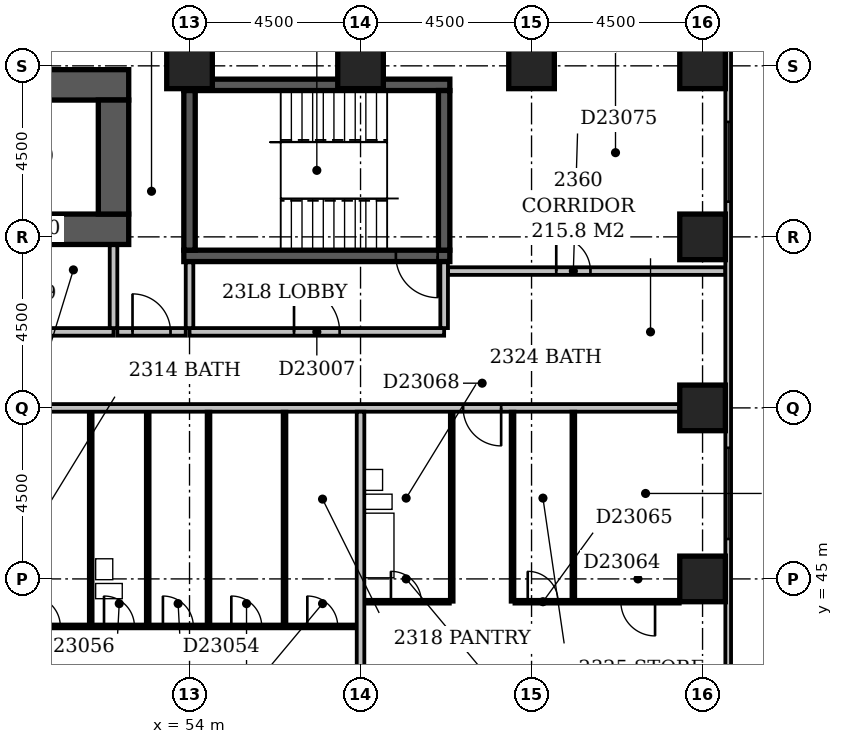
"""IFC4 building model, lengths in metres.
Left out: names, types, materials, properties, quantities, classifications, styles, units other than length and angle.
Written with IfcOpenShell. Run it as: python <this file> out.ifc"""

import sys

from ifc_helpers import new_model, si_unit, direction, frame, frame_2d, origin, origin_2d, place, context, subcontext, project, spatial, rectangle, extrude, element, fill, save


model = new_model("IFC4")
c1 = context("Model", 3, precision=1e-05, world=origin(), true_north=direction((0.0, 1.0)))
c2 = subcontext(c1, "Body", "Model", "MODEL_VIEW")
j1 = project(units=[si_unit("LENGTHUNIT", "METRE"), si_unit("PLANEANGLEUNIT", "RADIAN")], contexts=[c1])
p1 = place(None, origin())
s1 = spatial("IfcSite", under=j1, at=p1, CompositionType="ELEMENT")
p2 = place(p1, origin())
s2 = spatial("IfcBuilding", under=s1, at=p2, CompositionType="ELEMENT")
p3 = place(p2, frame((0.0, 0.0, 93.8)))
s3 = spatial("IfcBuildingStorey", under=s2, at=p3, CompositionType="ELEMENT", Elevation=93.8)
for number, where, z_axis, x_axis in (
    (1, (47.0, 54.2, -0.3), (0.0, 0.0, 1.0), (1.0, 0.0, 0.0)),
    (2, (47.0, 58.0, -0.3), (0.0, 0.0, 1.0), (1.0, 0.0, 0.0)),
):
    element("IfcWall", number, at=place(p3, frame(where, z_axis=z_axis, x_axis=x_axis)), inside=s3, PredefinedType="SHEAR", context=c2, shape_type="SweptSolid", body=[
        extrude(rectangle(XDim=5.4, YDim=0.8, at=frame_2d((2.7, 0.0))), origin(), (0.0, 0.0, 1.0), 3.6),
    ])
p4 = place(p3, frame((52.0, 54.6, -0.3), z_axis=(0.0, 0.0, 1.0), x_axis=(0.0, 1.0, 0.0)))
e3 = element("IfcWall", 3, at=p4, inside=s3, PredefinedType="SHEAR", context=c2, shape_type="SweptSolid", body=[
    extrude(rectangle(XDim=3.0, YDim=0.8, at=frame_2d((1.5, 0.0))), origin(), (0.0, 0.0, 1.0), 3.6),
])
p5 = place(p3, frame((53.85, 53.5, -0.3), z_axis=(0.0, 0.0, 1.0), x_axis=(1.0, 0.0, 0.0)))
e4 = element("IfcWall", 4, at=p5, inside=s3, PredefinedType="SHEAR", context=c2, shape_type="SweptSolid", body=[
    extrude(rectangle(XDim=7.0, YDim=0.3, at=frame_2d((3.5, 0.0))), origin(), (0.0, 0.0, 1.0), 3.6),
])
p6 = place(p5, frame((5.58, 0.0, 0.3)))
e5 = element("IfcOpeningElement", 5, at=p6, cuts=e4, PredefinedType="OPENING", context=c2, shape_type="SweptSolid", body=[
    extrude(rectangle(XDim=1.1, YDim=2.1, at=frame_2d((0.55, 1.05))), frame((0.0, 0.162, 0.0), z_axis=(0.0, -1.0, 0.0), x_axis=(1.0, 0.0, 0.0)), (0.0, 0.0, 1.0), 0.324),
])
p7 = place(p3, frame((53.85, 58.0, -0.3), z_axis=(0.0, 0.0, 1.0), x_axis=(1.0, 0.0, 0.0)))
e6 = element("IfcWall", 6, at=p7, inside=s3, PredefinedType="SHEAR", context=c2, shape_type="SweptSolid", body=[
    extrude(rectangle(XDim=7.0, YDim=0.3, at=frame_2d((3.5, 0.0))), origin(), (0.0, 0.0, 1.0), 3.6),
])
for number, where, z_axis, x_axis in (
    (7, (54.0, 53.65, -0.3), (0.0, 0.0, 1.0), (0.0, 1.0, 0.0)),
    (8, (60.7, 53.65, -0.3), (0.0, 0.0, 1.0), (0.0, 1.0, 0.0)),
):
    element("IfcWall", number, at=place(p3, frame(where, z_axis=z_axis, x_axis=x_axis)), inside=s3, PredefinedType="SHEAR", context=c2, shape_type="SweptSolid", body=[
        extrude(rectangle(XDim=4.2, YDim=0.3, at=frame_2d((2.1, 0.0))), origin(), (0.0, 0.0, 1.0), 3.6),
    ])
for number, where, z_axis, x_axis in (
    (9, (67.5, 45.0, -0.3), (0.0, 0.0, 1.0), (1.0, 0.0, 0.0)),
    (10, (67.5, 49.5, -0.3), (0.0, 0.0, 1.0), (1.0, 0.0, 0.0)),
    (11, (67.5, 54.0, -0.3), (0.0, 0.0, 1.0), (1.0, 0.0, 0.0)),
    (12, (54.0, 58.5, -0.3), (0.0, 0.0, 1.0), (1.0, 0.0, 0.0)),
    (13, (58.5, 58.5, -0.3), (0.0, 0.0, 1.0), (1.0, 0.0, 0.0)),
    (14, (63.0, 58.5, -0.3), (0.0, 0.0, 1.0), (1.0, 0.0, 0.0)),
    (15, (67.5, 58.5, -0.3), (0.0, 0.0, 1.0), (1.0, 0.0, 0.0)),
):
    element("IfcColumn", number, at=place(p3, frame(where, z_axis=z_axis, x_axis=x_axis)), inside=s3, PredefinedType="COLUMN", context=c2, shape_type="SweptSolid", body=[
        extrude(rectangle(XDim=1.2, YDim=1.2, at=origin_2d()), origin(), (0.0, 0.0, 1.0), 3.6),
    ])
p8 = place(p3, frame((68.175, 35.4, 0.0), z_axis=(0.0, 0.0, 1.0), x_axis=(0.0, 1.0, 0.0)))
e16 = element("IfcWall", 16, at=p8, inside=s3, PredefinedType="STANDARD", context=c2, shape_type="SweptSolid", body=[
    extrude(rectangle(XDim=23.85, YDim=0.15, at=frame_2d((11.925, 0.0))), origin(), (0.0, 0.0, 1.0), 2.7),
])
p9 = place(p8, frame((2.49, 0.0, 0.6)))
e17 = element("IfcOpeningElement", 17, at=p9, cuts=e16, PredefinedType="OPENING", context=c2, shape_type="SweptSolid", body=[
    extrude(rectangle(XDim=1.8, YDim=1.8, at=frame_2d((0.9, 0.9))), frame((0.0, 0.087, 0.0), z_axis=(0.0, -1.0, 0.0), x_axis=(1.0, 0.0, 0.0)), (0.0, 0.0, 1.0), 0.174),
])
p10 = place(p8, frame((10.65, 0.0, 0.6)))
e18 = element("IfcOpeningElement", 18, at=p10, cuts=e16, PredefinedType="OPENING", context=c2, shape_type="SweptSolid", body=[
    extrude(rectangle(XDim=2.4, YDim=1.8, at=frame_2d((1.2, 0.9))), frame((0.0, 0.087, 0.0), z_axis=(0.0, -1.0, 0.0), x_axis=(1.0, 0.0, 0.0)), (0.0, 0.0, 1.0), 0.174),
])
p11 = place(p8, frame((19.526, 0.0, 0.6)))
e19 = element("IfcOpeningElement", 19, at=p11, cuts=e16, PredefinedType="OPENING", context=c2, shape_type="SweptSolid", body=[
    extrude(rectangle(XDim=2.1, YDim=1.8, at=frame_2d((1.05, 0.9))), frame((0.0, 0.087, 0.0), z_axis=(0.0, -1.0, 0.0), x_axis=(1.0, 0.0, 0.0)), (0.0, 0.0, 1.0), 0.174),
])
p12 = place(p3, frame((47.0, 51.5, 0.0), z_axis=(0.0, 0.0, 1.0), x_axis=(1.0, 0.0, 0.0)))
e20 = element("IfcWall", 20, at=p12, inside=s3, PredefinedType="PARTITIONING", context=c2, shape_type="SweptSolid", body=[
    extrude(rectangle(XDim=5.0, YDim=0.2, at=frame_2d((2.5, 0.0))), origin(), (0.0, 0.0, 1.0), 3.3),
])
p13 = place(p12, frame((1.9, 0.0, 0.0)))
e21 = element("IfcOpeningElement", 21, at=p13, cuts=e20, PredefinedType="OPENING", context=c2, shape_type="SweptSolid", body=[
    extrude(rectangle(XDim=1.2, YDim=2.1, at=frame_2d((0.6, 1.05))), frame((0.0, 0.112, 0.0), z_axis=(0.0, -1.0, 0.0), x_axis=(1.0, 0.0, 0.0)), (0.0, 0.0, 1.0), 0.224),
])
p14 = place(p3, frame((52.0, 51.6, 0.0), z_axis=(0.0, 0.0, 1.0), x_axis=(0.0, 1.0, 0.0)))
e22 = element("IfcWall", 22, at=p14, inside=s3, PredefinedType="PARTITIONING", context=c2, shape_type="SweptSolid", body=[
    extrude(rectangle(XDim=2.18, YDim=0.2, at=frame_2d((1.09, 0.0))), origin(), (0.0, 0.0, 1.0), 3.3),
])
p15 = place(p3, frame((54.0, 51.5, 0.0), z_axis=(0.0, 0.0, 1.0), x_axis=(1.0, 0.0, 0.0)))
e23 = element("IfcWall", 23, at=p15, inside=s3, PredefinedType="PARTITIONING", context=c2, shape_type="SweptSolid", body=[
    extrude(rectangle(XDim=6.7, YDim=0.2, at=frame_2d((3.35, 0.0))), origin(), (0.0, 0.0, 1.0), 3.3),
])
p16 = place(p15, frame((2.75, 0.0, 0.0)))
e24 = element("IfcOpeningElement", 24, at=p16, cuts=e23, PredefinedType="OPENING", context=c2, shape_type="SweptSolid", body=[
    extrude(rectangle(XDim=1.2, YDim=2.1, at=frame_2d((0.6, 1.05))), frame((0.0, 0.112, 0.0), z_axis=(0.0, -1.0, 0.0), x_axis=(1.0, 0.0, 0.0)), (0.0, 0.0, 1.0), 0.224),
])
p17 = place(p3, frame((60.7, 51.6, 0.0), z_axis=(0.0, 0.0, 1.0), x_axis=(0.0, 1.0, 0.0)))
e25 = element("IfcWall", 25, at=p17, inside=s3, PredefinedType="PARTITIONING", context=c2, shape_type="SweptSolid", body=[
    extrude(rectangle(XDim=1.73, YDim=0.2, at=frame_2d((0.865, 0.0))), origin(), (0.0, 0.0, 1.0), 3.3),
])
p18 = place(p3, frame((54.0, 51.6, 0.0), z_axis=(0.0, 0.0, 1.0), x_axis=(0.0, 1.0, 0.0)))
e26 = element("IfcWall", 26, at=p18, inside=s3, PredefinedType="PARTITIONING", context=c2, shape_type="SweptSolid", body=[
    extrude(rectangle(XDim=1.73, YDim=0.2, at=frame_2d((0.865, 0.0))), origin(), (0.0, 0.0, 1.0), 2.6),
])
p19 = place(p3, frame((58.5, 36.6, 0.0), z_axis=(0.0, 0.0, 1.0), x_axis=(0.0, 1.0, 0.0)))
e27 = element("IfcWall", 27, at=p19, inside=s3, PredefinedType="PARTITIONING", context=c2, shape_type="SweptSolid", body=[
    extrude(rectangle(XDim=12.8, YDim=0.2, at=frame_2d((6.4, 0.0))), origin(), (0.0, 0.0, 1.0), 3.3),
])
p20 = place(p3, frame((49.05, 43.75, 0.0), z_axis=(0.0, 0.0, 1.0), x_axis=(1.0, 0.0, 0.0)))
e28 = element("IfcWall", 28, at=p20, inside=s3, PredefinedType="PARTITIONING", context=c2, shape_type="SweptSolid", body=[
    extrude(rectangle(XDim=9.35, YDim=0.1, at=frame_2d((4.675, 0.0))), origin(), (0.0, 0.0, 1.0), 3.3),
])
p21 = place(p20, frame((0.75, 0.0, 0.0)))
e29 = element("IfcOpeningElement", 29, at=p21, cuts=e28, PredefinedType="OPENING", context=c2, shape_type="SweptSolid", body=[
    extrude(rectangle(XDim=0.8, YDim=2.1, at=frame_2d((0.4, 1.05))), frame((0.0, 0.062, 0.0), z_axis=(0.0, -1.0, 0.0), x_axis=(1.0, 0.0, 0.0)), (0.0, 0.0, 1.0), 0.124),
])
p22 = place(p20, frame((8.05, 0.0, 0.0)))
e30 = element("IfcOpeningElement", 30, at=p22, cuts=e28, PredefinedType="OPENING", context=c2, shape_type="SweptSolid", body=[
    extrude(rectangle(XDim=0.8, YDim=2.1, at=frame_2d((0.4, 1.05))), frame((0.0, 0.062, 0.0), z_axis=(0.0, -1.0, 0.0), x_axis=(1.0, 0.0, 0.0)), (0.0, 0.0, 1.0), 0.124),
])
p23 = place(p20, frame((4.25, 0.0, 0.0)))
e31 = element("IfcOpeningElement", 31, at=p23, cuts=e28, PredefinedType="OPENING", context=c2, shape_type="SweptSolid", body=[
    extrude(rectangle(XDim=0.8, YDim=2.1, at=frame_2d((0.4, 1.05))), frame((0.0, 0.062, 0.0), z_axis=(0.0, -1.0, 0.0), x_axis=(1.0, 0.0, 0.0)), (0.0, 0.0, 1.0), 0.124),
])
p24 = place(p20, frame((6.05, 0.0, 0.0)))
e32 = element("IfcOpeningElement", 32, at=p24, cuts=e28, PredefinedType="OPENING", context=c2, shape_type="SweptSolid", body=[
    extrude(rectangle(XDim=0.8, YDim=2.1, at=frame_2d((0.4, 1.05))), frame((0.0, 0.062, 0.0), z_axis=(0.0, -1.0, 0.0), x_axis=(1.0, 0.0, 0.0)), (0.0, 0.0, 1.0), 0.124),
])
p25 = place(p20, frame((2.7, 0.0, 0.0)))
e33 = element("IfcOpeningElement", 33, at=p25, cuts=e28, PredefinedType="OPENING", context=c2, shape_type="SweptSolid", body=[
    extrude(rectangle(XDim=0.8, YDim=2.1, at=frame_2d((0.4, 1.05))), frame((0.0, 0.062, 0.0), z_axis=(0.0, -1.0, 0.0), x_axis=(1.0, 0.0, 0.0)), (0.0, 0.0, 1.0), 0.124),
])
for number, where, z_axis, x_axis in (
    (34, (51.4, 43.8, 0.0), (0.0, 0.0, 1.0), (0.0, 1.0, 0.0)),
    (35, (52.9, 43.8, 0.0), (0.0, 0.0, 1.0), (0.0, 1.0, 0.0)),
):
    element("IfcWall", number, at=place(p3, frame(where, z_axis=z_axis, x_axis=x_axis)), inside=s3, PredefinedType="PLUMBINGWALL", context=c2, shape_type="SweptSolid", body=[
        extrude(rectangle(XDim=5.6, YDim=0.1, at=frame_2d((2.8, 0.0))), origin(), (0.0, 0.0, 1.0), 3.3),
    ])
p26 = place(p3, frame((54.5, 43.8, 0.0), z_axis=(0.0, 0.0, 1.0), x_axis=(0.0, 1.0, 0.0)))
e36 = element("IfcWall", 36, at=p26, inside=s3, PredefinedType="PARTITIONING", context=c2, shape_type="SweptSolid", body=[
    extrude(rectangle(XDim=5.6, YDim=0.1, at=frame_2d((2.8, 0.0))), origin(), (0.0, 0.0, 1.0), 2.6),
])
p27 = place(p3, frame((56.5, 43.8, 0.0), z_axis=(0.0, 0.0, 1.0), x_axis=(0.0, 1.0, 0.0)))
e37 = element("IfcWall", 37, at=p27, inside=s3, PredefinedType="PARTITIONING", context=c2, shape_type="SweptSolid", body=[
    extrude(rectangle(XDim=5.6, YDim=0.1, at=frame_2d((2.8, 0.0))), origin(), (0.0, 0.0, 1.0), 3.3),
])
p28 = place(p3, frame((58.6, 44.4, 0.0), z_axis=(0.0, 0.0, 1.0), x_axis=(1.0, 0.0, 0.0)))
e38 = element("IfcWall", 38, at=p28, inside=s3, PredefinedType="PARTITIONING", context=c2, shape_type="SweptSolid", body=[
    extrude(rectangle(XDim=2.25, YDim=0.1, at=frame_2d((1.125, 0.0))), origin(), (0.0, 0.0, 1.0), 3.3),
])
p29 = place(p28, frame((0.7, 0.0, 0.0)))
e39 = element("IfcOpeningElement", 39, at=p29, cuts=e38, PredefinedType="OPENING", context=c2, shape_type="SweptSolid", body=[
    extrude(rectangle(XDim=0.8, YDim=2.1, at=frame_2d((0.4, 1.05))), frame((0.0, 0.062, 0.0), z_axis=(0.0, -1.0, 0.0), x_axis=(1.0, 0.0, 0.0)), (0.0, 0.0, 1.0), 0.124),
])
p30 = place(p3, frame((60.9, 44.4, 0.0), z_axis=(0.0, 0.0, 1.0), x_axis=(0.0, 1.0, 0.0)))
e40 = element("IfcWall", 40, at=p30, inside=s3, PredefinedType="PLUMBINGWALL", context=c2, shape_type="SweptSolid", body=[
    extrude(rectangle(XDim=5.0, YDim=0.1, at=frame_2d((2.5, 0.0))), origin(), (0.0, 0.0, 1.0), 3.3),
])
p31 = place(p3, frame((62.5, 44.4, 0.0), z_axis=(0.0, 0.0, 1.0), x_axis=(0.0, 1.0, 0.0)))
e41 = element("IfcWall", 41, at=p31, inside=s3, PredefinedType="PARTITIONING", context=c2, shape_type="SweptSolid", body=[
    extrude(rectangle(XDim=5.0, YDim=0.1, at=frame_2d((2.5, 0.0))), origin(), (0.0, 0.0, 1.0), 2.4),
])
p32 = place(p3, frame((62.55, 44.4, 0.0), z_axis=(0.0, 0.0, 1.0), x_axis=(1.0, 0.0, 0.0)))
e42 = element("IfcWall", 42, at=p32, inside=s3, PredefinedType="PARTITIONING", context=c2, shape_type="SweptSolid", body=[
    extrude(rectangle(XDim=4.35, YDim=0.1, at=frame_2d((2.175, 0.0))), origin(), (0.0, 0.0, 1.0), 3.3),
])
p33 = place(p32, frame((2.8, 0.0, 0.0)))
e43 = element("IfcOpeningElement", 43, at=p33, cuts=e42, PredefinedType="OPENING", context=c2, shape_type="SweptSolid", body=[
    extrude(rectangle(XDim=0.9, YDim=2.1, at=frame_2d((0.45, 1.05))), frame((0.0, 0.062, 0.0), z_axis=(0.0, -1.0, 0.0), x_axis=(1.0, 0.0, 0.0)), (0.0, 0.0, 1.0), 0.124),
])
p34 = place(p32, frame((0.35, 0.0, 0.0)))
e44 = element("IfcOpeningElement", 44, at=p34, cuts=e42, PredefinedType="OPENING", context=c2, shape_type="SweptSolid", body=[
    extrude(rectangle(XDim=0.8, YDim=2.1, at=frame_2d((0.4, 1.05))), frame((0.0, 0.062, 0.0), z_axis=(0.0, -1.0, 0.0), x_axis=(1.0, 0.0, 0.0)), (0.0, 0.0, 1.0), 0.124),
])
p35 = place(p3, frame((64.1, 44.45, 0.0), z_axis=(0.0, 0.0, 1.0), x_axis=(0.0, 1.0, 0.0)))
e45 = element("IfcWall", 45, at=p35, inside=s3, PredefinedType="PARTITIONING", context=c2, shape_type="SweptSolid", body=[
    extrude(rectangle(XDim=4.95, YDim=0.1, at=frame_2d((2.475, 0.0))), origin(), (0.0, 0.0, 1.0), 3.3),
])
p36 = place(p3, frame((9.1, 49.5, 0.0), z_axis=(0.0, 0.0, 1.0), x_axis=(1.0, 0.0, 0.0)))
e46 = element("IfcWall", 46, at=p36, inside=s3, PredefinedType="PARTITIONING", context=c2, shape_type="SweptSolid", body=[
    extrude(rectangle(XDim=57.8, YDim=0.2, at=frame_2d((28.9, 0.0))), origin(), (0.0, 0.0, 1.0), 3.3),
])
p37 = place(p36, frame((13.7, 0.0, 0.0)))
e47 = element("IfcOpeningElement", 47, at=p37, cuts=e46, PredefinedType="OPENING", context=c2, shape_type="SweptSolid", body=[
    extrude(rectangle(XDim=1.0, YDim=2.1, at=frame_2d((0.5, 1.05))), frame((0.0, 0.112, 0.0), z_axis=(0.0, -1.0, 0.0), x_axis=(1.0, 0.0, 0.0)), (0.0, 0.0, 1.0), 0.224),
])
p38 = place(p36, frame((38.6, 0.0, 0.0)))
e48 = element("IfcOpeningElement", 48, at=p38, cuts=e46, PredefinedType="OPENING", context=c2, shape_type="SweptSolid", body=[
    extrude(rectangle(XDim=1.0, YDim=2.1, at=frame_2d((0.5, 1.05))), frame((0.0, 0.112, 0.0), z_axis=(0.0, -1.0, 0.0), x_axis=(1.0, 0.0, 0.0)), (0.0, 0.0, 1.0), 0.224),
])
p39 = place(p36, frame((52.1, 0.0, 0.0)))
e49 = element("IfcOpeningElement", 49, at=p39, cuts=e46, PredefinedType="OPENING", context=c2, shape_type="SweptSolid", body=[
    extrude(rectangle(XDim=1.0, YDim=2.1, at=frame_2d((0.5, 1.05))), frame((0.0, 0.112, 0.0), z_axis=(0.0, -1.0, 0.0), x_axis=(1.0, 0.0, 0.0)), (0.0, 0.0, 1.0), 0.224),
])
p40 = place(p36, frame((6.15, 0.0, 0.0)))
e50 = element("IfcOpeningElement", 50, at=p40, cuts=e46, PredefinedType="OPENING", context=c2, shape_type="SweptSolid", body=[
    extrude(rectangle(XDim=0.9, YDim=2.1, at=frame_2d((0.45, 1.05))), frame((0.0, 0.112, 0.0), z_axis=(0.0, -1.0, 0.0), x_axis=(1.0, 0.0, 0.0)), (0.0, 0.0, 1.0), 0.224),
])
p41 = place(p36, frame((10.65, 0.0, 0.0)))
e51 = element("IfcOpeningElement", 51, at=p41, cuts=e46, PredefinedType="OPENING", context=c2, shape_type="SweptSolid", body=[
    extrude(rectangle(XDim=0.9, YDim=2.1, at=frame_2d((0.45, 1.05))), frame((0.0, 0.112, 0.0), z_axis=(0.0, -1.0, 0.0), x_axis=(1.0, 0.0, 0.0)), (0.0, 0.0, 1.0), 0.224),
])
p42 = place(p3, frame((52.1, 51.5, 0.0), z_axis=(0.0, 0.0, 1.0), x_axis=(1.0, 0.0, 0.0)))
e52 = element("IfcWall", 52, at=p42, inside=s3, PredefinedType="PARTITIONING", context=c2, shape_type="SweptSolid", body=[
    extrude(rectangle(XDim=1.8, YDim=0.2, at=frame_2d((0.9, 0.0))), origin(), (0.0, 0.0, 1.0), 3.3),
])
p43 = place(p42, frame((0.4, 0.0, 0.0)))
e53 = element("IfcOpeningElement", 53, at=p43, cuts=e52, PredefinedType="OPENING", context=c2, shape_type="SweptSolid", body=[
    extrude(rectangle(XDim=1.0, YDim=2.1, at=frame_2d((0.5, 1.05))), frame((0.0, 0.112, 0.0), z_axis=(0.0, -1.0, 0.0), x_axis=(1.0, 0.0, 0.0)), (0.0, 0.0, 1.0), 0.224),
])
p44 = place(p3, frame((60.8, 53.1, 0.0), z_axis=(0.0, 0.0, 1.0), x_axis=(1.0, 0.0, 0.0)))
e54 = element("IfcWall", 54, at=p44, inside=s3, PredefinedType="PARTITIONING", context=c2, shape_type="SweptSolid", body=[
    extrude(rectangle(XDim=7.3, YDim=0.2, at=frame_2d((3.65, 0.0))), origin(), (0.0, 0.0, 1.0), 3.3),
])
p45 = place(p44, frame((2.85, 0.0, 0.0)))
e55 = element("IfcOpeningElement", 55, at=p45, cuts=e54, PredefinedType="OPENING", context=c2, shape_type="SweptSolid", body=[
    extrude(rectangle(XDim=0.9, YDim=2.1, at=frame_2d((0.45, 1.05))), frame((0.0, 0.112, 0.0), z_axis=(0.0, -1.0, 0.0), x_axis=(1.0, 0.0, 0.0)), (0.0, 0.0, 1.0), 0.224),
])
p46 = place(p10, origin())
e56 = element("IfcWindow", 56, at=p46, inside=s3, PartitioningType="SINGLE_PANEL", PredefinedType="WINDOW", context=c2, shape_type="SweptSolid", body=[
    extrude(rectangle(XDim=2.4, YDim=1.8, at=frame_2d((1.2, 0.9))), frame((0.0, 0.03, 0.0), z_axis=(0.0, -1.0, 0.0), x_axis=(1.0, 0.0, 0.0)), (0.0, 0.0, 1.0), 0.06),
])
fill(e18, e56)
p47 = place(p11, origin())
e57 = element("IfcWindow", 57, at=p47, inside=s3, PartitioningType="SINGLE_PANEL", PredefinedType="WINDOW", context=c2, shape_type="SweptSolid", body=[
    extrude(rectangle(XDim=2.1, YDim=1.8, at=frame_2d((1.05, 0.9))), frame((0.0, 0.03, 0.0), z_axis=(0.0, -1.0, 0.0), x_axis=(1.0, 0.0, 0.0)), (0.0, 0.0, 1.0), 0.06),
])
fill(e19, e57)
p48 = place(p16, origin())
e58 = element("IfcDoor", 58, at=p48, inside=s3, OperationType="SINGLE_SWING_LEFT", PredefinedType="DOOR", context=c2, shape_type="SweptSolid", body=[
    extrude(rectangle(XDim=1.2, YDim=2.1, at=frame_2d((0.6, 1.05))), frame((0.0, 0.025, 0.0), z_axis=(0.0, -1.0, 0.0), x_axis=(1.0, 0.0, 0.0)), (0.0, 0.0, 1.0), 0.05),
])
fill(e24, e58)
p49 = place(p6, origin())
e59 = element("IfcDoor", 59, at=p49, inside=s3, OperationType="SINGLE_SWING_RIGHT", PredefinedType="DOOR", context=c2, shape_type="SweptSolid", body=[
    extrude(rectangle(XDim=1.1, YDim=2.1, at=frame_2d((0.55, 1.05))), frame((0.0, 0.025, 0.0), z_axis=(0.0, -1.0, 0.0), x_axis=(1.0, 0.0, 0.0)), (0.0, 0.0, 1.0), 0.05),
])
fill(e5, e59)
p50 = place(p21, origin())
e60 = element("IfcDoor", 60, at=p50, inside=s3, OperationType="SINGLE_SWING_LEFT", PredefinedType="DOOR", context=c2, shape_type="SweptSolid", body=[
    extrude(rectangle(XDim=0.8, YDim=2.1, at=frame_2d((0.4, 1.05))), frame((0.0, 0.025, 0.0), z_axis=(0.0, -1.0, 0.0), x_axis=(1.0, 0.0, 0.0)), (0.0, 0.0, 1.0), 0.05),
])
fill(e29, e60)
p51 = place(p22, origin())
e61 = element("IfcDoor", 61, at=p51, inside=s3, OperationType="SINGLE_SWING_LEFT", PredefinedType="DOOR", context=c2, shape_type="SweptSolid", body=[
    extrude(rectangle(XDim=0.8, YDim=2.1, at=frame_2d((0.4, 1.05))), frame((0.0, 0.025, 0.0), z_axis=(0.0, -1.0, 0.0), x_axis=(1.0, 0.0, 0.0)), (0.0, 0.0, 1.0), 0.05),
])
fill(e30, e61)
p52 = place(p23, origin())
e62 = element("IfcDoor", 62, at=p52, inside=s3, OperationType="SINGLE_SWING_LEFT", PredefinedType="DOOR", context=c2, shape_type="SweptSolid", body=[
    extrude(rectangle(XDim=0.8, YDim=2.1, at=frame_2d((0.4, 1.05))), frame((0.0, 0.025, 0.0), z_axis=(0.0, -1.0, 0.0), x_axis=(1.0, 0.0, 0.0)), (0.0, 0.0, 1.0), 0.05),
])
fill(e31, e62)
p53 = place(p24, origin())
e63 = element("IfcDoor", 63, at=p53, inside=s3, OperationType="SINGLE_SWING_LEFT", PredefinedType="DOOR", context=c2, shape_type="SweptSolid", body=[
    extrude(rectangle(XDim=0.8, YDim=2.1, at=frame_2d((0.4, 1.05))), frame((0.0, 0.025, 0.0), z_axis=(0.0, -1.0, 0.0), x_axis=(1.0, 0.0, 0.0)), (0.0, 0.0, 1.0), 0.05),
])
fill(e32, e63)
p54 = place(p25, origin())
e64 = element("IfcDoor", 64, at=p54, inside=s3, OperationType="SINGLE_SWING_LEFT", PredefinedType="DOOR", context=c2, shape_type="SweptSolid", body=[
    extrude(rectangle(XDim=0.8, YDim=2.1, at=frame_2d((0.4, 1.05))), frame((0.0, 0.025, 0.0), z_axis=(0.0, -1.0, 0.0), x_axis=(1.0, 0.0, 0.0)), (0.0, 0.0, 1.0), 0.05),
])
fill(e33, e64)
p55 = place(p29, origin())
e65 = element("IfcDoor", 65, at=p55, inside=s3, OperationType="SINGLE_SWING_LEFT", PredefinedType="DOOR", context=c2, shape_type="SweptSolid", body=[
    extrude(rectangle(XDim=0.8, YDim=2.1, at=frame_2d((0.4, 1.05))), frame((0.0, 0.025, 0.0), z_axis=(0.0, -1.0, 0.0), x_axis=(1.0, 0.0, 0.0)), (0.0, 0.0, 1.0), 0.05),
])
fill(e39, e65)
p56 = place(p33, origin())
e66 = element("IfcDoor", 66, at=p56, inside=s3, OperationType="SINGLE_SWING_RIGHT", PredefinedType="DOOR", context=c2, shape_type="SweptSolid", body=[
    extrude(rectangle(XDim=0.9, YDim=2.1, at=frame_2d((0.45, 1.05))), frame((0.0, 0.025, 0.0), z_axis=(0.0, -1.0, 0.0), x_axis=(1.0, 0.0, 0.0)), (0.0, 0.0, 1.0), 0.05),
])
fill(e43, e66)
p57 = place(p34, origin())
e67 = element("IfcDoor", 67, at=p57, inside=s3, OperationType="SINGLE_SWING_LEFT", PredefinedType="DOOR", context=c2, shape_type="SweptSolid", body=[
    extrude(rectangle(XDim=0.8, YDim=2.1, at=frame_2d((0.4, 1.05))), frame((0.0, 0.025, 0.0), z_axis=(0.0, -1.0, 0.0), x_axis=(1.0, 0.0, 0.0)), (0.0, 0.0, 1.0), 0.05),
])
fill(e44, e67)
p58 = place(p39, origin())
e68 = element("IfcDoor", 68, at=p58, inside=s3, OperationType="SINGLE_SWING_RIGHT", PredefinedType="DOOR", context=c2, shape_type="SweptSolid", body=[
    extrude(rectangle(XDim=1.0, YDim=2.1, at=frame_2d((0.5, 1.05))), frame((0.0, 0.025, 0.0), z_axis=(0.0, -1.0, 0.0), x_axis=(1.0, 0.0, 0.0)), (0.0, 0.0, 1.0), 0.05),
])
fill(e49, e68)
p59 = place(p43, origin())
e69 = element("IfcDoor", 69, at=p59, inside=s3, OperationType="SINGLE_SWING_LEFT", PredefinedType="DOOR", context=c2, shape_type="SweptSolid", body=[
    extrude(rectangle(XDim=1.0, YDim=2.1, at=frame_2d((0.5, 1.05))), frame((0.0, 0.025, 0.0), z_axis=(0.0, -1.0, 0.0), x_axis=(1.0, 0.0, 0.0)), (0.0, 0.0, 1.0), 0.05),
])
fill(e53, e69)
p60 = place(p45, origin())
e70 = element("IfcDoor", 70, at=p60, inside=s3, OperationType="SINGLE_SWING_LEFT", PredefinedType="DOOR", context=c2, shape_type="SweptSolid", body=[
    extrude(rectangle(XDim=0.9, YDim=2.1, at=frame_2d((0.45, 1.05))), frame((0.0, 0.025, 0.0), z_axis=(0.0, -1.0, 0.0), x_axis=(1.0, 0.0, 0.0)), (0.0, 0.0, 1.0), 0.05),
])
fill(e55, e70)
save(model, sys.argv[1])
